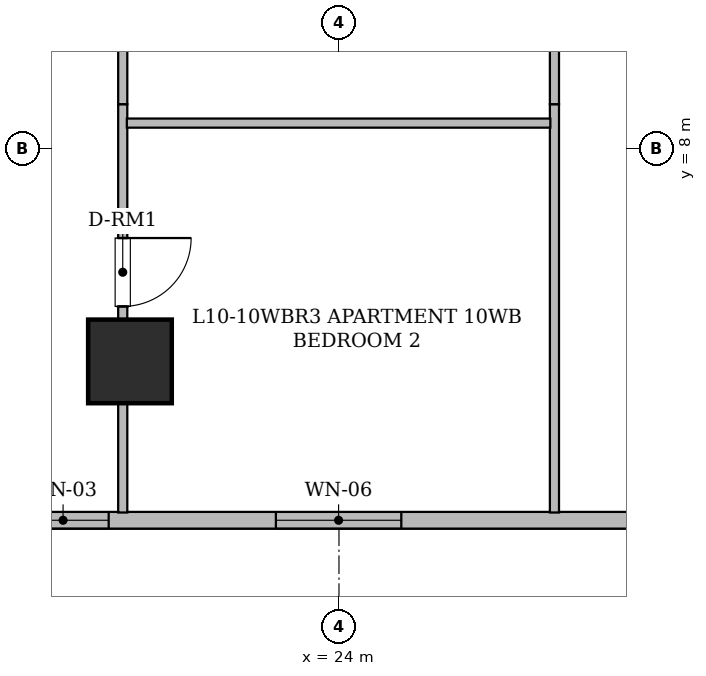
"""IFC4 building model, lengths in metres.
Left out: names, types, materials, properties, quantities, classifications, styles, units other than length and angle.
Written with IfcOpenShell. Run it as: python <this file> out.ifc"""

import sys

from ifc_helpers import new_model, si_unit, direction, frame, frame_2d, origin, origin_2d, place, context, subcontext, project, spatial, rectangle, hollow_rectangle, extrude, element, fill, save


model = new_model("IFC4")
c1 = context("Model", 3, precision=1e-05, world=origin(), true_north=direction((0.0, 1.0)))
c2 = subcontext(c1, "Body", "Model", "MODEL_VIEW")
j1 = project(units=[si_unit("LENGTHUNIT", "METRE"), si_unit("PLANEANGLEUNIT", "RADIAN")], contexts=[c1])
p1 = place(None, origin())
s1 = spatial("IfcSite", under=j1, at=p1, CompositionType="ELEMENT")
p2 = place(p1, origin())
s2 = spatial("IfcBuilding", under=s1, at=p2, CompositionType="ELEMENT")
p3 = place(p2, frame((0.0, 0.0, 44.25)))
s3 = spatial("IfcBuildingStorey", under=s2, at=p3, CompositionType="ELEMENT", Elevation=44.25)
p4 = place(p3, frame((21.25, 5.2, 0.0), z_axis=(0.0, 0.0, 1.0), x_axis=(1.0, 0.0, 0.0)))
e1 = element("IfcColumn", 1, at=p4, inside=s3, PredefinedType="COLUMN", context=c2, shape_type="SweptSolid", body=[
    extrude(hollow_rectangle(XDim=1.1, YDim=1.1, WallThickness=0.055, at=origin_2d()), origin(), (0.0, 0.0, 1.0), 3.65),
])
p5 = place(p3, frame((45.683, 3.11, 0.0), z_axis=(0.0, 0.0, 1.0), x_axis=(-1.0, 0.0, 0.0)))
e2 = element("IfcWall", 2, at=p5, inside=s3, PredefinedType="STANDARD", context=c2, shape_type="SweptSolid", body=[
    extrude(rectangle(XDim=37.368, YDim=0.22, at=frame_2d((18.684, 0.0))), origin(), (0.0, 0.0, 1.0), 3.43),
])
p6 = place(p5, frame((14.508, 0.0, 0.85)))
e3 = element("IfcOpeningElement", 3, at=p6, cuts=e2, PredefinedType="OPENING", context=c2, shape_type="SweptSolid", body=[
    extrude(rectangle(XDim=1.65, YDim=1.55, at=frame_2d((0.825, 0.775))), frame((0.0, 0.12, 0.0), z_axis=(0.0, -1.0, 0.0), x_axis=(1.0, 0.0, 0.0)), (0.0, 0.0, 1.0), 0.24),
])
p7 = place(p5, frame((33.025, 0.0, 0.85)))
e4 = element("IfcOpeningElement", 4, at=p7, cuts=e2, PredefinedType="OPENING", context=c2, shape_type="SweptSolid", body=[
    extrude(rectangle(XDim=1.65, YDim=1.55, at=frame_2d((0.825, 0.775))), frame((0.0, 0.12, 0.0), z_axis=(0.0, -1.0, 0.0), x_axis=(1.0, 0.0, 0.0)), (0.0, 0.0, 1.0), 0.24),
])
p8 = place(p5, frame((24.713, 0.0, 0.8)))
e5 = element("IfcOpeningElement", 5, at=p8, cuts=e2, PredefinedType="OPENING", context=c2, shape_type="SweptSolid", body=[
    extrude(rectangle(XDim=1.2, YDim=1.5, at=frame_2d((0.6, 0.75))), frame((0.0, 0.12, 0.0), z_axis=(0.0, -1.0, 0.0), x_axis=(1.0, 0.0, 0.0)), (0.0, 0.0, 1.0), 0.24),
])
p9 = place(p5, frame((28.113, 0.0, 0.85)))
e6 = element("IfcOpeningElement", 6, at=p9, cuts=e2, PredefinedType="OPENING", context=c2, shape_type="SweptSolid", body=[
    extrude(rectangle(XDim=1.65, YDim=1.55, at=frame_2d((0.825, 0.775))), frame((0.0, 0.12, 0.0), z_axis=(0.0, -1.0, 0.0), x_axis=(1.0, 0.0, 0.0)), (0.0, 0.0, 1.0), 0.24),
])
p10 = place(p5, frame((20.863, 0.0, 0.85)))
e7 = element("IfcOpeningElement", 7, at=p10, cuts=e2, PredefinedType="OPENING", context=c2, shape_type="SweptSolid", body=[
    extrude(rectangle(XDim=1.65, YDim=1.55, at=frame_2d((0.825, 0.775))), frame((0.0, 0.12, 0.0), z_axis=(0.0, -1.0, 0.0), x_axis=(1.0, 0.0, 0.0)), (0.0, 0.0, 1.0), 0.24),
])
p11 = place(p5, frame((10.428, 0.0, 0.8)))
e8 = element("IfcOpeningElement", 8, at=p11, cuts=e2, PredefinedType="OPENING", context=c2, shape_type="SweptSolid", body=[
    extrude(rectangle(XDim=1.2, YDim=1.5, at=frame_2d((0.6, 0.75))), frame((0.0, 0.12, 0.0), z_axis=(0.0, -1.0, 0.0), x_axis=(1.0, 0.0, 0.0)), (0.0, 0.0, 1.0), 0.24),
])
p12 = place(p5, frame((6.453, 0.0, 0.85)))
e9 = element("IfcOpeningElement", 9, at=p12, cuts=e2, PredefinedType="OPENING", context=c2, shape_type="SweptSolid", body=[
    extrude(rectangle(XDim=1.65, YDim=1.55, at=frame_2d((0.825, 0.775))), frame((0.0, 0.12, 0.0), z_axis=(0.0, -1.0, 0.0), x_axis=(1.0, 0.0, 0.0)), (0.0, 0.0, 1.0), 0.24),
])
p13 = place(p5, frame((2.157, 0.0, 0.85)))
e10 = element("IfcOpeningElement", 10, at=p13, cuts=e2, PredefinedType="OPENING", context=c2, shape_type="SweptSolid", body=[
    extrude(rectangle(XDim=1.65, YDim=1.55, at=frame_2d((0.825, 0.775))), frame((0.0, 0.12, 0.0), z_axis=(0.0, -1.0, 0.0), x_axis=(1.0, 0.0, 0.0)), (0.0, 0.0, 1.0), 0.24),
])
p14 = place(p3, frame((26.835, 3.212, 0.0), z_axis=(0.0, 0.0, 1.0), x_axis=(0.0, 1.0, 0.0)))
e11 = element("IfcWall", 11, at=p14, inside=s3, PredefinedType="PARTITIONING", context=c2, shape_type="SweptSolid", body=[
    extrude(rectangle(XDim=5.372, YDim=0.12, at=frame_2d((2.686, 0.0))), origin(), (0.0, 0.0, 1.0), 2.803),
])
p15 = place(p3, frame((26.835, 8.584, 0.0), z_axis=(0.0, 0.0, 1.0), x_axis=(0.0, 1.0, 0.0)))
e12 = element("IfcWall", 12, at=p15, inside=s3, PredefinedType="PARTITIONING", context=c2, shape_type="SweptSolid", body=[
    extrude(rectangle(XDim=5.942, YDim=0.12, at=frame_2d((2.971, 0.0))), origin(), (0.0, 0.0, 1.0), 3.43),
])
p16 = place(p3, frame((21.155, 8.584, 0.0), z_axis=(0.0, 0.0, 1.0), x_axis=(0.0, -1.0, 0.0)))
e13 = element("IfcWall", 13, at=p16, inside=s3, PredefinedType="PARTITIONING", context=c2, shape_type="SweptSolid", body=[
    extrude(rectangle(XDim=5.372, YDim=0.12, at=frame_2d((2.686, 0.0))), origin(), (0.0, 0.0, 1.0), 2.647),
])
p17 = place(p16, frame((1.761, 0.0, 0.0)))
e14 = element("IfcOpeningElement", 14, at=p17, cuts=e13, PredefinedType="OPENING", context=c2, shape_type="SweptSolid", body=[
    extrude(rectangle(XDim=0.9, YDim=2.1, at=frame_2d((0.45, 1.05))), frame((0.0, 0.07, 0.0), z_axis=(0.0, -1.0, 0.0), x_axis=(1.0, 0.0, 0.0)), (0.0, 0.0, 1.0), 0.14),
])
p18 = place(p3, frame((21.155, 14.84, 0.0), z_axis=(0.0, 0.0, 1.0), x_axis=(0.0, -1.0, 0.0)))
e15 = element("IfcWall", 15, at=p18, inside=s3, PredefinedType="PARTITIONING", context=c2, shape_type="SweptSolid", body=[
    extrude(rectangle(XDim=6.256, YDim=0.12, at=frame_2d((3.128, 0.0))), origin(), (0.0, 0.0, 1.0), 3.43),
])
p19 = place(p18, frame((2.678, 0.0, 0.0)))
e16 = element("IfcOpeningElement", 16, at=p19, cuts=e15, PredefinedType="OPENING", context=c2, shape_type="SweptSolid", body=[
    extrude(rectangle(XDim=0.9, YDim=2.1, at=frame_2d((0.45, 1.05))), frame((0.0, 0.07, 0.0), z_axis=(0.0, -1.0, 0.0), x_axis=(1.0, 0.0, 0.0)), (0.0, 0.0, 1.0), 0.14),
])
p20 = place(p3, frame((21.209, 8.335, 0.0), z_axis=(0.0, 0.0, 1.0), x_axis=(1.0, 0.0, 0.0)))
e17 = element("IfcWall", 17, at=p20, inside=s3, PredefinedType="PARTITIONING", context=c2, shape_type="SweptSolid", body=[
    extrude(rectangle(XDim=5.572, YDim=0.12, at=frame_2d((2.786, 0.0))), origin(), (0.0, 0.0, 1.0), 3.43),
])
p21 = place(p8, origin())
e18 = element("IfcWindow", 18, at=p21, inside=s3, PartitioningType="SINGLE_PANEL", PredefinedType="WINDOW", context=c2, shape_type="SweptSolid", body=[
    extrude(rectangle(XDim=1.2, YDim=1.5, at=frame_2d((0.6, 0.75))), frame((0.0, 0.03, 0.0), z_axis=(0.0, -1.0, 0.0), x_axis=(1.0, 0.0, 0.0)), (0.0, 0.0, 1.0), 0.06),
])
fill(e5, e18)
p22 = place(p10, origin())
e19 = element("IfcWindow", 19, at=p22, inside=s3, PartitioningType="SINGLE_PANEL", PredefinedType="WINDOW", context=c2, shape_type="SweptSolid", body=[
    extrude(rectangle(XDim=1.65, YDim=1.55, at=frame_2d((0.825, 0.775))), frame((0.0, 0.03, 0.0), z_axis=(0.0, -1.0, 0.0), x_axis=(1.0, 0.0, 0.0)), (0.0, 0.0, 1.0), 0.06),
])
fill(e7, e19)
p23 = place(p17, origin())
e20 = element("IfcDoor", 20, at=p23, inside=s3, OperationType="SINGLE_SWING_LEFT", PredefinedType="DOOR", context=c2, shape_type="SweptSolid", body=[
    extrude(rectangle(XDim=0.9, YDim=2.1, at=frame_2d((0.45, 1.05))), frame((0.0, 0.025, 0.0), z_axis=(0.0, -1.0, 0.0), x_axis=(1.0, 0.0, 0.0)), (0.0, 0.0, 1.0), 0.05),
])
fill(e14, e20)
save(model, sys.argv[1])
